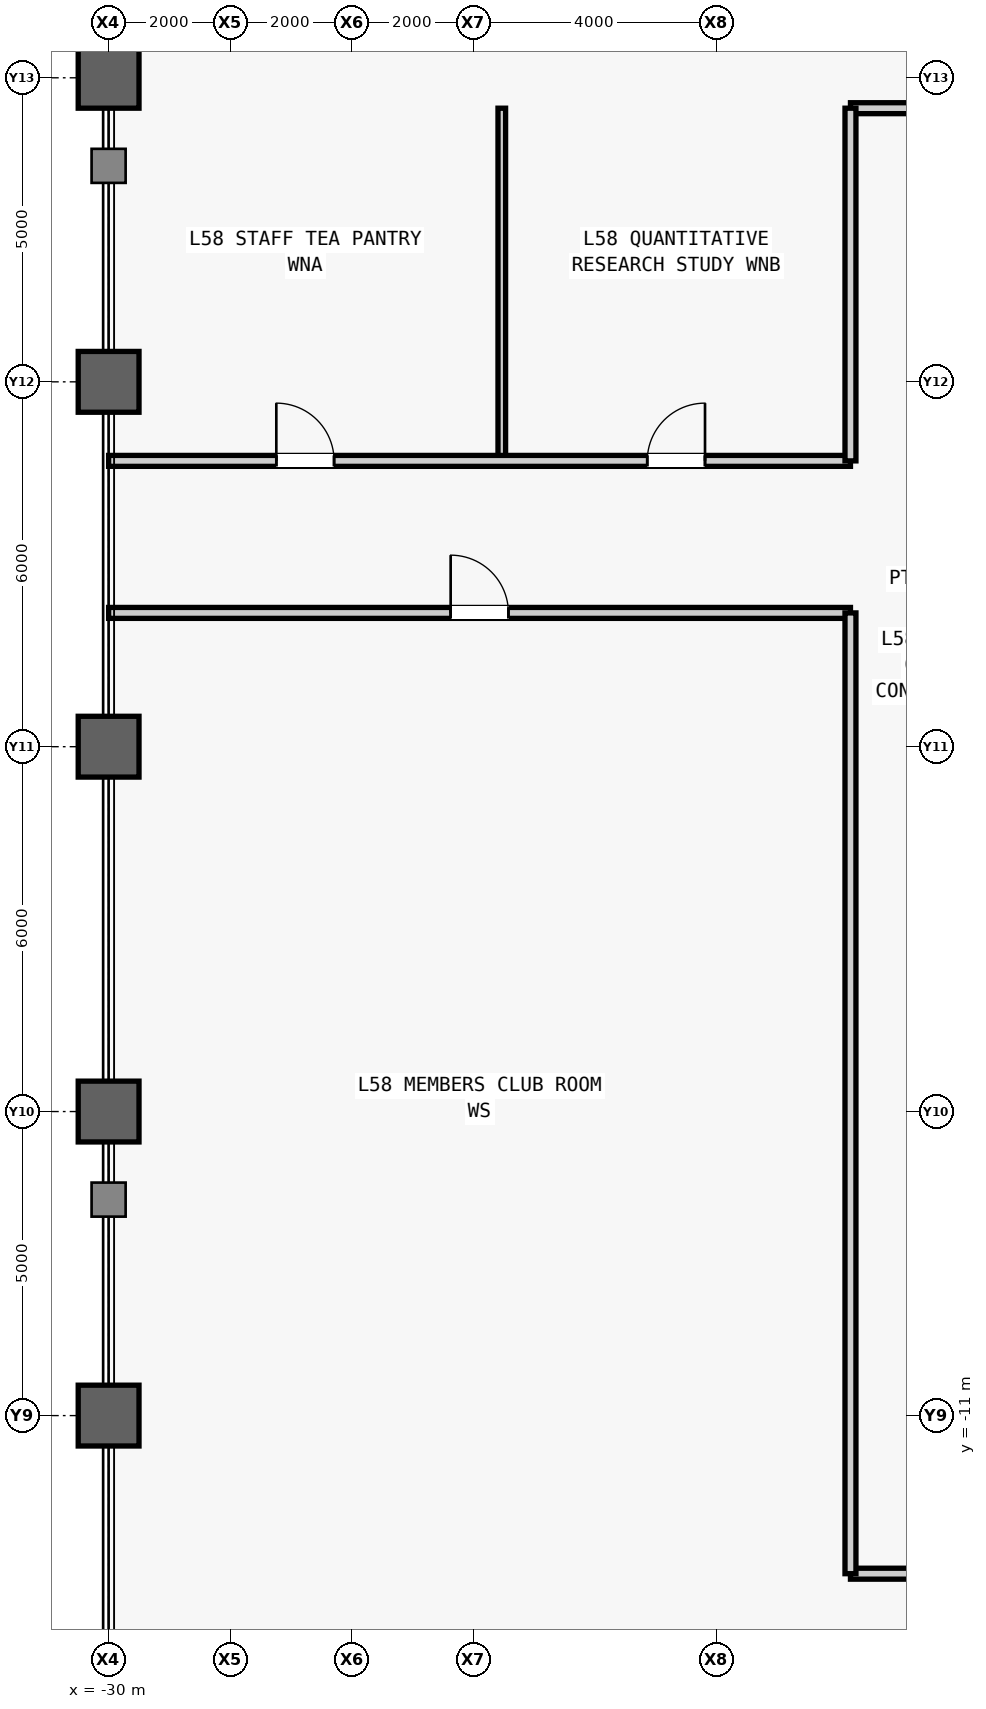
"""IFC4 building model, lengths in metres.
Left out: names, types, materials, properties, quantities, classifications, styles, units other than length and angle.
Written with IfcOpenShell. Run it as: python <this file> out.ifc"""

import sys

from ifc_helpers import new_model, si_unit, direction, frame, frame_2d, origin, origin_2d, place, context, subcontext, project, spatial, rectangle, hollow_rectangle, extrude, source, transform, mapped, element, fill, save


model = new_model("IFC4")
c1 = context("Model", 3, precision=1e-05, world=origin(), true_north=direction((0.0, 1.0)))
c2 = subcontext(c1, "Body", "Model", "MODEL_VIEW")
j1 = project(units=[si_unit("LENGTHUNIT", "METRE"), si_unit("PLANEANGLEUNIT", "RADIAN")], contexts=[c1])
p1 = place(None, origin())
s1 = spatial("IfcSite", under=j1, at=p1, CompositionType="ELEMENT")
p2 = place(p1, origin())
s2 = spatial("IfcBuilding", under=s1, at=p2, CompositionType="ELEMENT")
p3 = place(p2, frame((0.0, 0.0, 247.1)))
s3 = spatial("IfcBuildingStorey", under=s2, at=p3, CompositionType="ELEMENT", Elevation=247.1)
m1 = source(origin(), c2, "Body", "SweptSolid", [
    extrude(hollow_rectangle(XDim=1.0, YDim=1.0, WallThickness=0.055, at=origin_2d()), origin(), (0.0, 0.0, 1.0), 4.0),
])
for number, where, z_axis, x_axis in (
    (1, (-30.0, -11.0, 0.0), (0.0, 0.0, 1.0), (1.0, 0.0, 0.0)),
    (2, (-30.0, -6.0, 0.0), (0.0, 0.0, 1.0), (1.0, 0.0, 0.0)),
    (3, (-30.0, 0.0, 0.0), (0.0, 0.0, 1.0), (1.0, 0.0, 0.0)),
    (4, (-30.0, 6.0, 0.0), (0.0, 0.0, 1.0), (1.0, 0.0, 0.0)),
    (5, (-30.0, 11.0, 0.0), (0.0, 0.0, 1.0), (1.0, 0.0, 0.0)),
):
    element("IfcColumn", number, at=place(p3, frame(where, z_axis=z_axis, x_axis=x_axis)), inside=s3, PredefinedType="COLUMN", context=c2, shape_type="MappedRepresentation", body=[
        mapped(m1, transform((0.0, 0.0, 0.0), scale=1.0)),
    ])
m2 = source(origin(), c2, "Body", "SweptSolid", [
    extrude(rectangle(XDim=2.45, YDim=0.18, at=frame_2d((1.225, 0.0))), origin(), (0.0, 0.0, 1.0), 3.78),
])
for number, where, z_axis, x_axis in (
    (6, (-17.8, 10.5, 0.0), (0.0, 0.0, 1.0), (1.0, 0.0, 0.0)),
    (7, (-17.8, -13.6, 0.0), (0.0, 0.0, 1.0), (1.0, 0.0, 0.0)),
):
    element("IfcWall", number, at=place(p3, frame(where, z_axis=z_axis, x_axis=x_axis)), inside=s3, PredefinedType="PARTITIONING", context=c2, shape_type="MappedRepresentation", body=[
        mapped(m2, transform((0.0, 0.0, 0.0), scale=1.0)),
    ])
m3 = source(origin(), c2, "Body", "SweptSolid", [
    extrude(rectangle(XDim=12.2, YDim=0.18, at=frame_2d((6.1, 0.0))), origin(), (0.0, 0.0, 1.0), 3.78),
])
p4 = place(p3, frame((-30.0, 2.2, 0.0), z_axis=(0.0, 0.0, 1.0), x_axis=(1.0, 0.0, 0.0)))
e8 = element("IfcWall", 8, at=p4, inside=s3, PredefinedType="PARTITIONING", context=c2, shape_type="MappedRepresentation", body=[
    mapped(m3, transform((0.0, 0.0, 0.0), scale=1.0)),
])
m4 = source(origin(), c2, "Body", "SweptSolid", [
    extrude(rectangle(XDim=0.95, YDim=2.15, at=frame_2d((0.475, 1.075))), frame((0.0, 0.1, 0.0), z_axis=(0.0, -1.0, 0.0), x_axis=(1.0, 0.0, 0.0)), (0.0, 0.0, 1.0), 0.2),
])
p5 = place(p4, frame((5.625, 0.0, 0.0)))
e9 = element("IfcOpeningElement", 9, at=p5, cuts=e8, PredefinedType="OPENING", context=c2, shape_type="MappedRepresentation", body=[
    mapped(m4, transform((0.0, 0.0, 0.0), scale=1.0)),
])
m5 = source(origin(), c2, "Body", "SweptSolid", [
    extrude(rectangle(XDim=15.8, YDim=0.18, at=frame_2d((7.9, 0.0))), origin(), (0.0, 0.0, 1.0), 3.78),
])
p6 = place(p3, frame((-17.8, -13.6, 0.0), z_axis=(0.0, 0.0, 1.0), x_axis=(0.0, 1.0, 0.0)))
e10 = element("IfcWall", 10, at=p6, inside=s3, PredefinedType="PARTITIONING", context=c2, shape_type="MappedRepresentation", body=[
    mapped(m5, transform((0.0, 0.0, 0.0), scale=1.0)),
])
m6 = source(origin(), c2, "Body", "SweptSolid", [
    extrude(rectangle(XDim=5.8, YDim=0.125, at=frame_2d((2.9, 0.0))), origin(), (0.0, 0.0, 1.0), 3.78),
])
p7 = place(p3, frame((-23.534, 4.7, 0.0), z_axis=(0.0, 0.0, 1.0), x_axis=(0.0, 1.0, 0.0)))
e11 = element("IfcWall", 11, at=p7, inside=s3, PredefinedType="PARTITIONING", context=c2, shape_type="MappedRepresentation", body=[
    mapped(m6, transform((0.0, 0.0, 0.0), scale=1.0)),
])
p8 = place(p3, frame((-30.0, 4.7, 0.0), z_axis=(0.0, 0.0, 1.0), x_axis=(1.0, 0.0, 0.0)))
e12 = element("IfcWall", 12, at=p8, inside=s3, PredefinedType="PARTITIONING", context=c2, shape_type="MappedRepresentation", body=[
    mapped(m3, transform((0.0, 0.0, 0.0), scale=1.0)),
])
p9 = place(p8, frame((2.758, 0.0, 0.0)))
e13 = element("IfcOpeningElement", 13, at=p9, cuts=e12, PredefinedType="OPENING", context=c2, shape_type="MappedRepresentation", body=[
    mapped(m4, transform((0.0, 0.0, 0.0), scale=1.0)),
])
p10 = place(p8, frame((8.858, 0.0, 0.0)))
e14 = element("IfcOpeningElement", 14, at=p10, cuts=e12, PredefinedType="OPENING", context=c2, shape_type="MappedRepresentation", body=[
    mapped(m4, transform((0.0, 0.0, 0.0), scale=1.0)),
])
m7 = source(origin(), c2, "Body", "SweptSolid", [
    extrude(rectangle(XDim=5.8, YDim=0.18, at=frame_2d((2.9, 0.0))), origin(), (0.0, 0.0, 1.0), 3.78),
])
p11 = place(p3, frame((-17.8, 4.7, 0.0), z_axis=(0.0, 0.0, 1.0), x_axis=(0.0, 1.0, 0.0)))
e15 = element("IfcWall", 15, at=p11, inside=s3, PredefinedType="PARTITIONING", context=c2, shape_type="MappedRepresentation", body=[
    mapped(m7, transform((0.0, 0.0, 0.0), scale=1.0)),
])
m8 = source(origin(), c2, "Body", "SweptSolid", [
    extrude(rectangle(XDim=0.95, YDim=2.15, at=frame_2d((0.475, 1.075))), frame((0.0, 0.025, 0.0), z_axis=(0.0, -1.0, 0.0), x_axis=(1.0, 0.0, 0.0)), (0.0, 0.0, 1.0), 0.05),
])
p12 = place(p5, origin())
e16 = element("IfcDoor", 16, at=p12, inside=s3, OperationType="SINGLE_SWING_LEFT", PredefinedType="DOOR", context=c2, shape_type="MappedRepresentation", body=[
    mapped(m8, transform((0.0, 0.0, 0.0), scale=1.0)),
])
fill(e9, e16)
p13 = place(p9, origin())
e17 = element("IfcDoor", 17, at=p13, inside=s3, OperationType="SINGLE_SWING_LEFT", PredefinedType="DOOR", context=c2, shape_type="MappedRepresentation", body=[
    mapped(m8, transform((0.0, 0.0, 0.0), scale=1.0)),
])
fill(e13, e17)
p14 = place(p10, origin())
e18 = element("IfcDoor", 18, at=p14, inside=s3, OperationType="SINGLE_SWING_RIGHT", PredefinedType="DOOR", context=c2, shape_type="MappedRepresentation", body=[
    mapped(m8, transform((0.0, 0.0, 0.0), scale=1.0)),
])
fill(e14, e18)
save(model, sys.argv[1])
